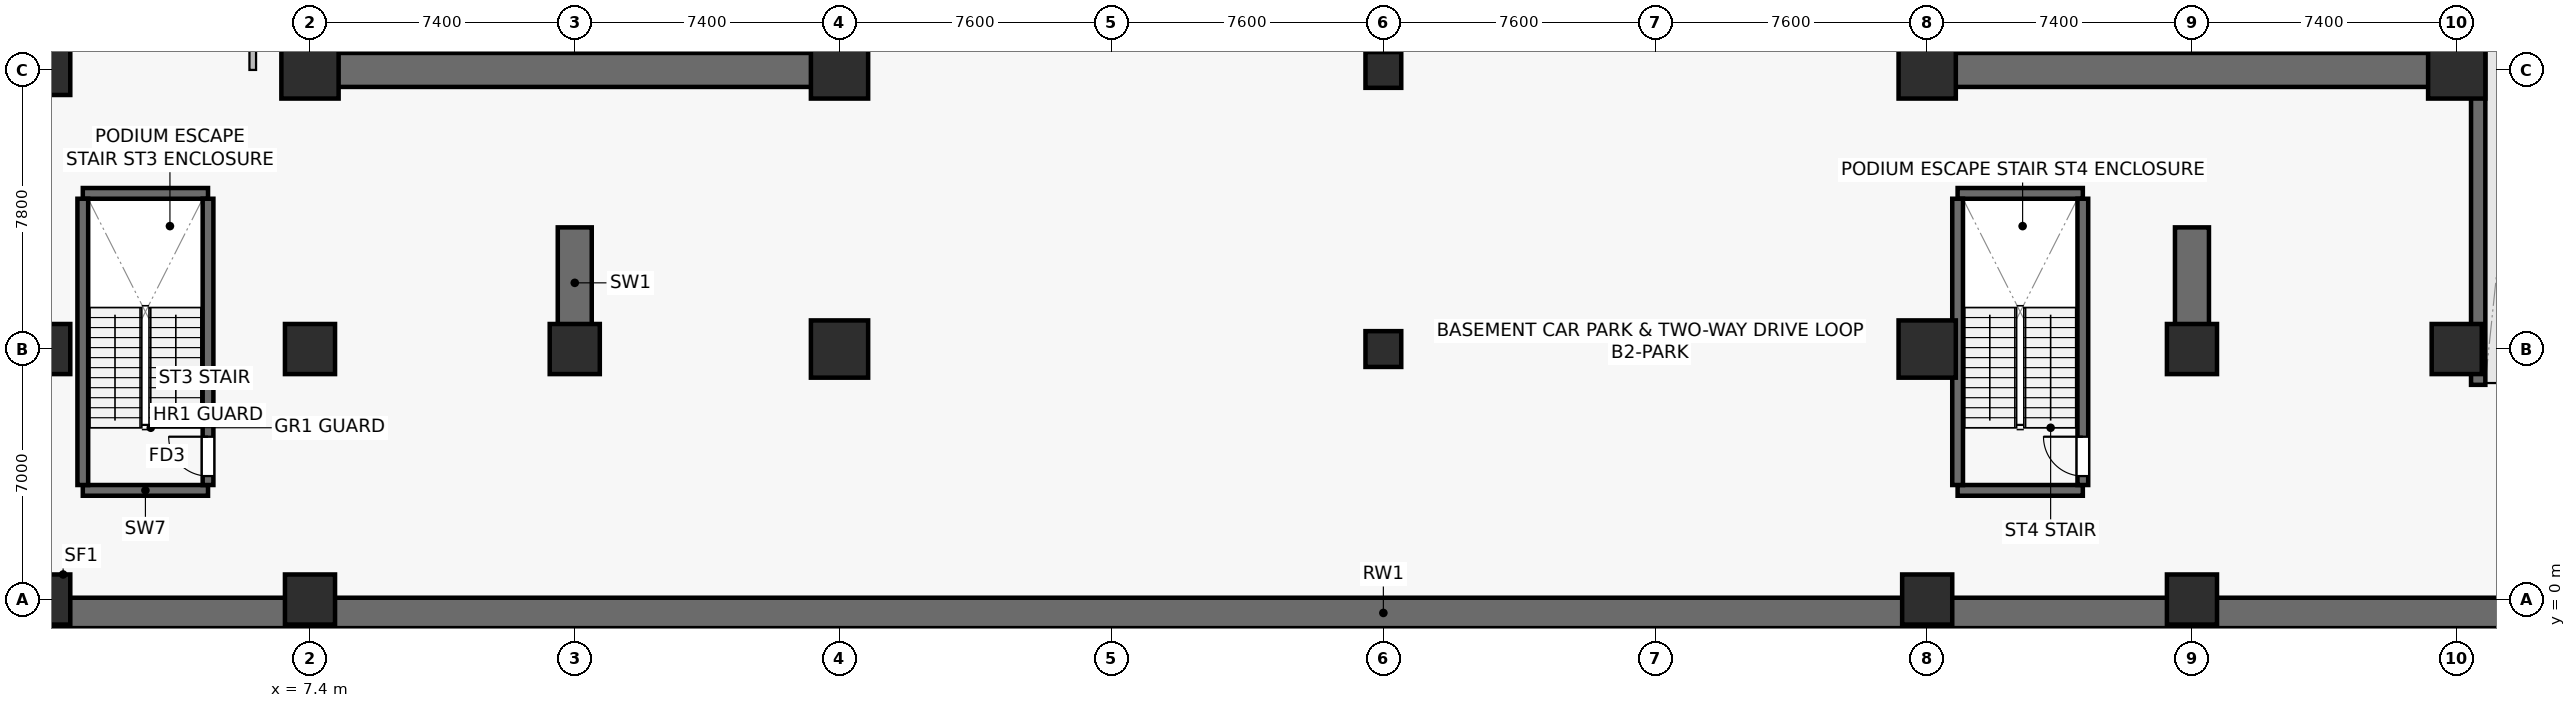
"""IFC4 building model, lengths in metres.
Left out: names, types, materials, properties, quantities, classifications, styles, units other than length and angle.
Written with IfcOpenShell. Run it as: python <this file> out.ifc"""

import sys

from ifc_helpers import new_model, si_unit, direction, frame, frame_2d, origin, origin_2d, place, context, subcontext, project, spatial, rectangle, extrude, source, transform, mapped, element, fill, save


model = new_model("IFC4")
c1 = context("Model", 3, precision=1e-05, world=origin(), true_north=direction((0.0, 1.0)))
c2 = subcontext(c1, "Body", "Model", "MODEL_VIEW")
j1 = project(units=[si_unit("LENGTHUNIT", "METRE"), si_unit("PLANEANGLEUNIT", "RADIAN")], contexts=[c1])
p1 = place(None, origin())
s1 = spatial("IfcSite", under=j1, at=p1, CompositionType="ELEMENT")
p2 = place(p1, origin())
s2 = spatial("IfcBuilding", under=s1, at=p2, CompositionType="ELEMENT")
p3 = place(p2, frame((0.0, 0.0, -9.6)))
s3 = spatial("IfcBuildingStorey", under=s2, at=p3, CompositionType="ELEMENT", Elevation=-9.6)
p4 = place(p3, frame((6.925, 14.8, 0.0), z_axis=(0.0, 0.0, 1.0), x_axis=(1.0, 0.0, 0.0)))
e1 = element("IfcWall", 1, at=p4, inside=s3, PredefinedType="SHEAR", context=c2, shape_type="SweptSolid", body=[
    extrude(rectangle(XDim=15.75, YDim=0.95, at=frame_2d((7.875, 0.0))), origin(), (0.0, 0.0, 1.0), 4.42),
])
p5 = place(p3, frame((7.4, 15.275, 0.0), z_axis=(0.0, 0.0, 1.0), x_axis=(0.0, 1.0, 0.0)))
e2 = element("IfcWall", 2, at=p5, inside=s3, PredefinedType="SHEAR", context=c2, shape_type="SweptSolid", body=[
    extrude(rectangle(XDim=18.05, YDim=0.95, at=frame_2d((9.025, 0.0))), origin(), (0.0, 0.0, 1.0), 4.42),
])
p6 = place(p3, frame((22.2, 15.275, 0.0), z_axis=(0.0, 0.0, 1.0), x_axis=(0.0, 1.0, 0.0)))
e3 = element("IfcWall", 3, at=p6, inside=s3, PredefinedType="SHEAR", context=c2, shape_type="SweptSolid", body=[
    extrude(rectangle(XDim=18.05, YDim=0.95, at=frame_2d((9.025, 0.0))), origin(), (0.0, 0.0, 1.0), 4.42),
])
p7 = place(p6, frame((3.275, 0.0, 0.0)))
e4 = element("IfcOpeningElement", 4, at=p7, cuts=e3, PredefinedType="OPENING", context=c2, shape_type="SweptSolid", body=[
    extrude(rectangle(XDim=1.42, YDim=2.2, at=frame_2d((0.71, 1.1))), frame((0.0, 0.485, 0.0), z_axis=(0.0, -1.0, 0.0), x_axis=(1.0, 0.0, 0.0)), (0.0, 0.0, 1.0), 0.97),
])
p8 = place(p3, frame((52.125, 14.8, 0.0), z_axis=(0.0, 0.0, 1.0), x_axis=(1.0, 0.0, 0.0)))
e5 = element("IfcWall", 5, at=p8, inside=s3, PredefinedType="SHEAR", context=c2, shape_type="SweptSolid", body=[
    extrude(rectangle(XDim=15.75, YDim=0.95, at=frame_2d((7.875, 0.0))), origin(), (0.0, 0.0, 1.0), 4.42),
])
p9 = place(p3, frame((52.6, 15.275, 0.0), z_axis=(0.0, 0.0, 1.0), x_axis=(0.0, 1.0, 0.0)))
e6 = element("IfcWall", 6, at=p9, inside=s3, PredefinedType="SHEAR", context=c2, shape_type="SweptSolid", body=[
    extrude(rectangle(XDim=18.05, YDim=0.95, at=frame_2d((9.025, 0.0))), origin(), (0.0, 0.0, 1.0), 4.42),
])
p10 = place(p9, frame((3.275, 0.0, 0.0)))
e7 = element("IfcOpeningElement", 7, at=p10, cuts=e6, PredefinedType="OPENING", context=c2, shape_type="SweptSolid", body=[
    extrude(rectangle(XDim=1.42, YDim=2.2, at=frame_2d((0.71, 1.1))), frame((0.0, 0.485, 0.0), z_axis=(0.0, -1.0, 0.0), x_axis=(1.0, 0.0, 0.0)), (0.0, 0.0, 1.0), 0.97),
])
p11 = place(p3, frame((67.4, 15.275, 0.0), z_axis=(0.0, 0.0, 1.0), x_axis=(0.0, 1.0, 0.0)))
e8 = element("IfcWall", 8, at=p11, inside=s3, PredefinedType="SHEAR", context=c2, shape_type="SweptSolid", body=[
    extrude(rectangle(XDim=18.05, YDim=0.95, at=frame_2d((9.025, 0.0))), origin(), (0.0, 0.0, 1.0), 4.42),
])
for number, where, z_axis, x_axis in (
    (9, (1.05, 3.05, 0.0), (0.0, 0.0, 1.0), (1.0, 0.0, 0.0)),
    (10, (1.05, 11.35, 0.0), (0.0, 0.0, 1.0), (1.0, 0.0, 0.0)),
):
    element("IfcWall", number, at=place(p3, frame(where, z_axis=z_axis, x_axis=x_axis)), inside=s3, PredefinedType="SHEAR", context=c2, shape_type="SweptSolid", body=[
        extrude(rectangle(XDim=3.5, YDim=0.3, at=frame_2d((1.75, 0.0))), origin(), (0.0, 0.0, 1.0), 4.42),
    ])
p12 = place(p3, frame((1.05, 3.2, 0.0), z_axis=(0.0, 0.0, 1.0), x_axis=(0.0, 1.0, 0.0)))
e11 = element("IfcWall", 11, at=p12, inside=s3, PredefinedType="SHEAR", context=c2, shape_type="SweptSolid", body=[
    extrude(rectangle(XDim=8.0, YDim=0.3, at=frame_2d((4.0, 0.0))), origin(), (0.0, 0.0, 1.0), 4.42),
])
p13 = place(p3, frame((4.55, 3.2, 0.0), z_axis=(0.0, 0.0, 1.0), x_axis=(0.0, 1.0, 0.0)))
e12 = element("IfcWall", 12, at=p13, inside=s3, PredefinedType="SHEAR", context=c2, shape_type="SweptSolid", body=[
    extrude(rectangle(XDim=8.0, YDim=0.3, at=frame_2d((4.0, 0.0))), origin(), (0.0, 0.0, 1.0), 4.42),
])
p14 = place(p13, frame((0.25, 0.0, 0.0)))
e13 = element("IfcOpeningElement", 13, at=p14, cuts=e12, PredefinedType="OPENING", context=c2, shape_type="SweptSolid", body=[
    extrude(rectangle(XDim=1.1, YDim=2.15, at=frame_2d((0.55, 1.075))), frame((0.0, 0.16, 0.0), z_axis=(0.0, -1.0, 0.0), x_axis=(1.0, 0.0, 0.0)), (0.0, 0.0, 1.0), 0.32),
])
for number, where, z_axis, x_axis in (
    (14, (53.45, 3.05, 0.0), (0.0, 0.0, 1.0), (1.0, 0.0, 0.0)),
    (15, (53.45, 11.35, 0.0), (0.0, 0.0, 1.0), (1.0, 0.0, 0.0)),
):
    element("IfcWall", number, at=place(p3, frame(where, z_axis=z_axis, x_axis=x_axis)), inside=s3, PredefinedType="SHEAR", context=c2, shape_type="SweptSolid", body=[
        extrude(rectangle(XDim=3.5, YDim=0.3, at=frame_2d((1.75, 0.0))), origin(), (0.0, 0.0, 1.0), 4.42),
    ])
p15 = place(p3, frame((53.45, 3.2, 0.0), z_axis=(0.0, 0.0, 1.0), x_axis=(0.0, 1.0, 0.0)))
e16 = element("IfcWall", 16, at=p15, inside=s3, PredefinedType="SHEAR", context=c2, shape_type="SweptSolid", body=[
    extrude(rectangle(XDim=8.0, YDim=0.3, at=frame_2d((4.0, 0.0))), origin(), (0.0, 0.0, 1.0), 4.42),
])
p16 = place(p3, frame((56.95, 3.2, 0.0), z_axis=(0.0, 0.0, 1.0), x_axis=(0.0, 1.0, 0.0)))
e17 = element("IfcWall", 17, at=p16, inside=s3, PredefinedType="SHEAR", context=c2, shape_type="SweptSolid", body=[
    extrude(rectangle(XDim=8.0, YDim=0.3, at=frame_2d((4.0, 0.0))), origin(), (0.0, 0.0, 1.0), 4.42),
])
p17 = place(p16, frame((0.25, 0.0, 0.0)))
e18 = element("IfcOpeningElement", 18, at=p17, cuts=e17, PredefinedType="OPENING", context=c2, shape_type="SweptSolid", body=[
    extrude(rectangle(XDim=1.1, YDim=2.15, at=frame_2d((0.55, 1.075))), frame((0.0, 0.16, 0.0), z_axis=(0.0, -1.0, 0.0), x_axis=(1.0, 0.0, 0.0)), (0.0, 0.0, 1.0), 0.32),
])
for number, where, z_axis, x_axis in (
    (19, (14.8, 7.3, 0.0), (0.0, 0.0, 1.0), (0.0, 1.0, 0.0)),
    (20, (60.0, 7.3, 0.0), (0.0, 0.0, 1.0), (0.0, 1.0, 0.0)),
):
    element("IfcWall", number, at=place(p3, frame(where, z_axis=z_axis, x_axis=x_axis)), inside=s3, PredefinedType="SHEAR", context=c2, shape_type="SweptSolid", body=[
        extrude(rectangle(XDim=3.1, YDim=0.95, at=frame_2d((1.55, 0.0))), origin(), (0.0, 0.0, 1.0), 4.42),
    ])
p18 = place(p3, frame((-1.0, -0.375, 0.0), z_axis=(0.0, 0.0, 1.0), x_axis=(1.0, 0.0, 0.0)))
e21 = element("IfcWall", 21, at=p18, inside=s3, PredefinedType="SOLIDWALL", context=c2, shape_type="SweptSolid", body=[
    extrude(rectangle(XDim=76.8, YDim=0.85, at=frame_2d((38.4, 0.0))), origin(), (0.0, 0.0, 1.0), 4.42),
])
p19 = place(p3, frame((68.0, 6.0, 0.0), z_axis=(0.0, 0.0, 1.0), x_axis=(0.0, 1.0, 0.0)))
e22 = element("IfcWall", 22, at=p19, inside=s3, PredefinedType="SHEAR", context=c2, shape_type="SweptSolid", body=[
    extrude(rectangle(XDim=40.4, YDim=0.4, at=frame_2d((20.2, 0.0))), origin(), (0.0, 0.0, 1.0), 4.42),
])
m1 = source(origin(), c2, "Body", "SweptSolid", [
    extrude(rectangle(XDim=1.4, YDim=1.4, at=origin_2d()), origin(), (0.0, 0.0, 1.0), 4.8),
])
p20 = place(p3, frame((14.8, 7.0, 0.0), z_axis=(0.0, 0.0, 1.0), x_axis=(1.0, 0.0, 0.0)))
e23 = element("IfcColumn", 23, at=p20, inside=s3, PredefinedType="COLUMN", context=c2, shape_type="MappedRepresentation", body=[
    mapped(m1, transform((0.0, 0.0, 0.0), scale=1.0)),
])
m2 = source(origin(), c2, "Body", "SweptSolid", [
    extrude(rectangle(XDim=1.6, YDim=1.6, at=origin_2d()), origin(), (0.0, 0.0, 1.0), 4.8),
])
for number, where, z_axis, x_axis in (
    (24, (22.2, 7.0, 0.0), (0.0, 0.0, 1.0), (1.0, 0.0, 0.0)),
    (25, (7.4, 14.8, 0.0), (0.0, 0.0, 1.0), (1.0, 0.0, 0.0)),
    (26, (22.2, 14.8, 0.0), (0.0, 0.0, 1.0), (1.0, 0.0, 0.0)),
    (27, (52.6, 7.0, 0.0), (0.0, 0.0, 1.0), (1.0, 0.0, 0.0)),
):
    element("IfcColumn", number, at=place(p3, frame(where, z_axis=z_axis, x_axis=x_axis)), inside=s3, PredefinedType="COLUMN", context=c2, shape_type="MappedRepresentation", body=[
        mapped(m2, transform((0.0, 0.0, 0.0), scale=1.0)),
    ])
p21 = place(p3, frame((60.0, 7.0, 0.0), z_axis=(0.0, 0.0, 1.0), x_axis=(1.0, 0.0, 0.0)))
e28 = element("IfcColumn", 28, at=p21, inside=s3, PredefinedType="COLUMN", context=c2, shape_type="MappedRepresentation", body=[
    mapped(m1, transform((0.0, 0.0, 0.0), scale=1.0)),
])
for number, where, z_axis, x_axis in (
    (29, (52.6, 14.8, 0.0), (0.0, 0.0, 1.0), (1.0, 0.0, 0.0)),
    (30, (67.4, 14.8, 0.0), (0.0, 0.0, 1.0), (1.0, 0.0, 0.0)),
):
    element("IfcColumn", number, at=place(p3, frame(where, z_axis=z_axis, x_axis=x_axis)), inside=s3, PredefinedType="COLUMN", context=c2, shape_type="MappedRepresentation", body=[
        mapped(m2, transform((0.0, 0.0, 0.0), scale=1.0)),
    ])
for number, where, z_axis, x_axis in (
    (31, (7.4, 7.0, 0.0), (0.0, 0.0, 1.0), (1.0, 0.0, 0.0)),
    (32, (67.4, 7.0, 0.0), (0.0, 0.0, 1.0), (1.0, 0.0, 0.0)),
    (33, (0.0, 7.0, 0.0), (0.0, 0.0, 1.0), (1.0, 0.0, 0.0)),
    (34, (0.0, 14.8, 0.0), (0.0, 0.0, 1.0), (1.0, 0.0, 0.0)),
):
    element("IfcColumn", number, at=place(p3, frame(where, z_axis=z_axis, x_axis=x_axis)), inside=s3, PredefinedType="COLUMN", context=c2, shape_type="MappedRepresentation", body=[
        mapped(m1, transform((0.0, 0.0, 0.0), scale=1.0)),
    ])
m3 = source(origin(), c2, "Body", "SweptSolid", [
    extrude(rectangle(XDim=1.0, YDim=1.0, at=origin_2d()), origin(), (0.0, 0.0, 1.0), 4.8),
])
for number, where, z_axis, x_axis in (
    (35, (37.4, 7.0, 0.0), (0.0, 0.0, 1.0), (1.0, 0.0, 0.0)),
    (36, (37.4, 14.8, 0.0), (0.0, 0.0, 1.0), (1.0, 0.0, 0.0)),
):
    element("IfcColumn", number, at=place(p3, frame(where, z_axis=z_axis, x_axis=x_axis)), inside=s3, PredefinedType="COLUMN", context=c2, shape_type="MappedRepresentation", body=[
        mapped(m3, transform((0.0, 0.0, 0.0), scale=1.0)),
    ])
for number, where, z_axis, x_axis in (
    (37, (0.0, 0.0, 0.0), (0.0, 0.0, 1.0), (1.0, 0.0, 0.0)),
    (38, (7.4, 0.0, 0.0), (0.0, 0.0, 1.0), (1.0, 0.0, 0.0)),
    (39, (52.6, 0.0, 0.0), (0.0, 0.0, 1.0), (1.0, 0.0, 0.0)),
    (40, (60.0, 0.0, 0.0), (0.0, 0.0, 1.0), (1.0, 0.0, 0.0)),
):
    element("IfcColumn", number, at=place(p3, frame(where, z_axis=z_axis, x_axis=x_axis)), inside=s3, PredefinedType="COLUMN", context=c2, shape_type="MappedRepresentation", body=[
        mapped(m1, transform((0.0, 0.0, 0.0), scale=1.0)),
    ])
p22 = place(p3, frame((5.8, 14.8, 0.0), z_axis=(0.0, 0.0, 1.0), x_axis=(0.0, 1.0, 0.0)))
e41 = element("IfcWall", 41, at=p22, inside=s3, PredefinedType="SOLIDWALL", context=c2, shape_type="SweptSolid", body=[
    extrude(rectangle(XDim=19.4, YDim=0.185, at=frame_2d((9.7, 0.0))), origin(), (0.0, 0.0, 1.0), 3.605),
])
m4 = source(origin(), c2, "Body", "SweptSolid", [
    extrude(rectangle(XDim=1.1, YDim=2.15, at=frame_2d((0.55, 1.075))), frame((0.0, 0.025, 0.0), z_axis=(0.0, -1.0, 0.0), x_axis=(1.0, 0.0, 0.0)), (0.0, 0.0, 1.0), 0.05),
])
p23 = place(p14, origin())
e42 = element("IfcDoor", 42, at=p23, inside=s3, OperationType="SINGLE_SWING_RIGHT", PredefinedType="DOOR", context=c2, shape_type="MappedRepresentation", body=[
    mapped(m4, transform((0.0, 0.0, 0.0), scale=1.0)),
])
fill(e13, e42)
p24 = place(p17, origin())
e43 = element("IfcDoor", 43, at=p24, inside=s3, OperationType="SINGLE_SWING_RIGHT", PredefinedType="DOOR", context=c2, shape_type="MappedRepresentation", body=[
    mapped(m4, transform((0.0, 0.0, 0.0), scale=1.0)),
])
fill(e18, e43)
save(model, sys.argv[1])
